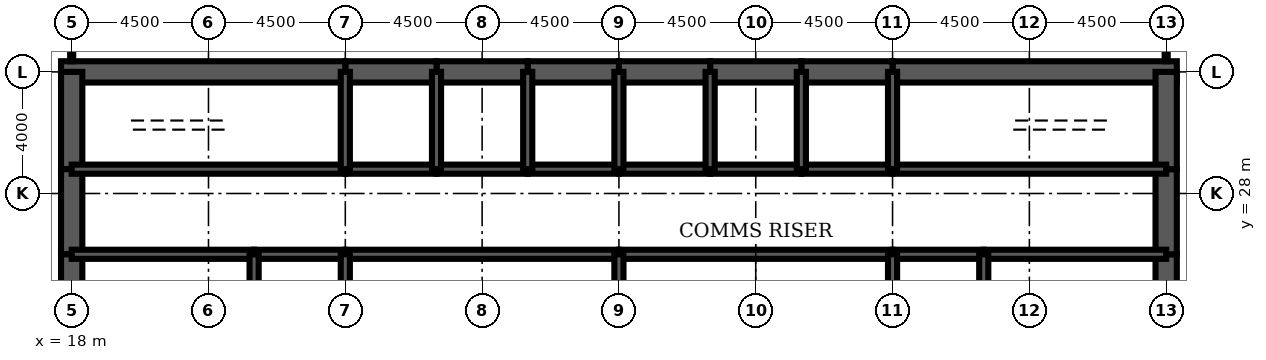
"""IFC4 building model, lengths in metres.
Left out: names, types, materials, properties, quantities, classifications, styles, units other than length and angle.
Written with IfcOpenShell. Run it as: python <this file> out.ifc"""

import sys

from ifc_helpers import new_model, si_unit, direction, frame, frame_2d, origin, place, context, subcontext, project, spatial, rectangle, extrude, element, fill, save


model = new_model("IFC4")
c1 = context("Model", 3, precision=1e-05, world=origin(), true_north=direction((0.0, 1.0)))
c2 = subcontext(c1, "Body", "Model", "MODEL_VIEW")
j1 = project(units=[si_unit("LENGTHUNIT", "METRE"), si_unit("PLANEANGLEUNIT", "RADIAN")], contexts=[c1])
p1 = place(None, origin())
s1 = spatial("IfcSite", under=j1, at=p1, CompositionType="ELEMENT")
p2 = place(p1, origin())
s2 = spatial("IfcBuilding", under=s1, at=p2, CompositionType="ELEMENT")
p3 = place(p2, frame((0.0, 0.0, 325.7)))
s3 = spatial("IfcBuildingStorey", under=s2, at=p3, CompositionType="ELEMENT", Elevation=325.7)
p4 = place(p3, frame((54.35, 32.0, 0.0), z_axis=(0.0, 0.0, 1.0), x_axis=(-1.0, 0.0, 0.0)))
e1 = element("IfcWall", 1, at=p4, inside=s3, PredefinedType="SHEAR", context=c2, shape_type="SweptSolid", body=[
    extrude(rectangle(XDim=9.35, YDim=0.7, at=frame_2d((4.675, 0.0))), origin(), (0.0, 0.0, 1.0), 4.2),
])
for number, where, z_axis, x_axis in (
    (2, (45.0, 32.0, 0.0), (0.0, 0.0, 1.0), (-1.0, 0.0, 0.0)),
    (3, (42.0, 32.0, 0.0), (0.0, 0.0, 1.0), (-1.0, 0.0, 0.0)),
    (4, (39.0, 32.0, 0.0), (0.0, 0.0, 1.0), (-1.0, 0.0, 0.0)),
    (5, (36.0, 32.0, 0.0), (0.0, 0.0, 1.0), (-1.0, 0.0, 0.0)),
    (6, (33.0, 32.0, 0.0), (0.0, 0.0, 1.0), (-1.0, 0.0, 0.0)),
    (7, (30.0, 32.0, 0.0), (0.0, 0.0, 1.0), (-1.0, 0.0, 0.0)),
):
    element("IfcWall", number, at=place(p3, frame(where, z_axis=z_axis, x_axis=x_axis)), inside=s3, PredefinedType="SHEAR", context=c2, shape_type="SweptSolid", body=[
        extrude(rectangle(XDim=3.0, YDim=0.7, at=frame_2d((1.5, 0.0))), origin(), (0.0, 0.0, 1.0), 4.2),
    ])
p5 = place(p3, frame((27.0, 32.0, 0.0), z_axis=(0.0, 0.0, 1.0), x_axis=(-1.0, 0.0, 0.0)))
e8 = element("IfcWall", 8, at=p5, inside=s3, PredefinedType="SHEAR", context=c2, shape_type="SweptSolid", body=[
    extrude(rectangle(XDim=9.35, YDim=0.7, at=frame_2d((4.675, 0.0))), origin(), (0.0, 0.0, 1.0), 4.2),
])
p6 = place(p3, frame((18.0, 32.0, 0.0), z_axis=(0.0, 0.0, 1.0), x_axis=(0.0, -1.0, 0.0)))
e9 = element("IfcWall", 9, at=p6, inside=s3, PredefinedType="SHEAR", context=c2, shape_type="SweptSolid", body=[
    extrude(rectangle(XDim=3.2, YDim=0.7, at=frame_2d((1.6, 0.0))), origin(), (0.0, 0.0, 1.0), 4.2),
])
p7 = place(p3, frame((18.0, 28.8, 0.0), z_axis=(0.0, 0.0, 1.0), x_axis=(0.0, -1.0, 0.0)))
e10 = element("IfcWall", 10, at=p7, inside=s3, PredefinedType="SHEAR", context=c2, shape_type="SweptSolid", body=[
    extrude(rectangle(XDim=2.8, YDim=0.7, at=frame_2d((1.4, 0.0))), origin(), (0.0, 0.0, 1.0), 4.2),
])
p8 = place(p7, frame((0.4, 0.0, 0.0)))
e11 = element("IfcOpeningElement", 11, at=p8, cuts=e10, PredefinedType="OPENING", context=c2, shape_type="SweptSolid", body=[
    extrude(rectangle(XDim=1.8, YDim=2.1, at=frame_2d((0.9, 1.05))), frame((0.0, 0.36, 0.0), z_axis=(0.0, -1.0, 0.0), x_axis=(1.0, 0.0, 0.0)), (0.0, 0.0, 1.0), 0.72),
])
for number, where, z_axis, x_axis in (
    (12, (18.0, 26.0, 0.0), (0.0, 0.0, 1.0), (0.0, -1.0, 0.0)),
    (13, (54.0, 22.0, 0.0), (0.0, 0.0, 1.0), (0.0, 1.0, 0.0)),
):
    element("IfcWall", number, at=place(p3, frame(where, z_axis=z_axis, x_axis=x_axis)), inside=s3, PredefinedType="SHEAR", context=c2, shape_type="SweptSolid", body=[
        extrude(rectangle(XDim=4.0, YDim=0.7, at=frame_2d((2.0, 0.0))), origin(), (0.0, 0.0, 1.0), 4.2),
    ])
p9 = place(p3, frame((54.0, 26.0, 0.0), z_axis=(0.0, 0.0, 1.0), x_axis=(0.0, 1.0, 0.0)))
e14 = element("IfcWall", 14, at=p9, inside=s3, PredefinedType="SHEAR", context=c2, shape_type="SweptSolid", body=[
    extrude(rectangle(XDim=2.8, YDim=0.7, at=frame_2d((1.4, 0.0))), origin(), (0.0, 0.0, 1.0), 4.2),
])
p10 = place(p9, frame((0.6, 0.0, 0.0)))
e15 = element("IfcOpeningElement", 15, at=p10, cuts=e14, PredefinedType="OPENING", context=c2, shape_type="SweptSolid", body=[
    extrude(rectangle(XDim=1.8, YDim=2.1, at=frame_2d((0.9, 1.05))), frame((0.0, 0.36, 0.0), z_axis=(0.0, -1.0, 0.0), x_axis=(1.0, 0.0, 0.0)), (0.0, 0.0, 1.0), 0.72),
])
p11 = place(p3, frame((54.0, 28.8, 0.0), z_axis=(0.0, 0.0, 1.0), x_axis=(0.0, 1.0, 0.0)))
e16 = element("IfcWall", 16, at=p11, inside=s3, PredefinedType="SHEAR", context=c2, shape_type="SweptSolid", body=[
    extrude(rectangle(XDim=3.2, YDim=0.7, at=frame_2d((1.6, 0.0))), origin(), (0.0, 0.0, 1.0), 4.2),
])
p12 = place(p3, frame((18.0, 28.8, 0.0), z_axis=(0.0, 0.0, 1.0), x_axis=(1.0, 0.0, 0.0)))
e17 = element("IfcWall", 17, at=p12, inside=s3, PredefinedType="SOLIDWALL", context=c2, shape_type="SweptSolid", body=[
    extrude(rectangle(XDim=9.0, YDim=0.3, at=frame_2d((4.5, 0.0))), origin(), (0.0, 0.0, 1.0), 4.2),
])
p13 = place(p12, frame((0.65, 0.0, 0.0)))
e18 = element("IfcOpeningElement", 18, at=p13, cuts=e17, PredefinedType="OPENING", context=c2, shape_type="SweptSolid", body=[
    extrude(rectangle(XDim=1.0, YDim=2.1, at=frame_2d((0.5, 1.05))), frame((0.0, 0.16, 0.0), z_axis=(0.0, -1.0, 0.0), x_axis=(1.0, 0.0, 0.0)), (0.0, 0.0, 1.0), 0.32),
])
p14 = place(p3, frame((27.0, 28.8, 0.0), z_axis=(0.0, 0.0, 1.0), x_axis=(1.0, 0.0, 0.0)))
e19 = element("IfcWall", 19, at=p14, inside=s3, PredefinedType="SOLIDWALL", context=c2, shape_type="SweptSolid", body=[
    extrude(rectangle(XDim=3.0, YDim=0.3, at=frame_2d((1.5, 0.0))), origin(), (0.0, 0.0, 1.0), 4.2),
])
p15 = place(p14, frame((0.95, 0.0, 0.0)))
e20 = element("IfcOpeningElement", 20, at=p15, cuts=e19, PredefinedType="OPENING", context=c2, shape_type="SweptSolid", body=[
    extrude(rectangle(XDim=1.1, YDim=2.2, at=frame_2d((0.55, 1.1))), frame((0.0, 0.16, 0.0), z_axis=(0.0, -1.0, 0.0), x_axis=(1.0, 0.0, 0.0)), (0.0, 0.0, 1.0), 0.32),
])
p16 = place(p3, frame((30.0, 28.8, 0.0), z_axis=(0.0, 0.0, 1.0), x_axis=(1.0, 0.0, 0.0)))
e21 = element("IfcWall", 21, at=p16, inside=s3, PredefinedType="SOLIDWALL", context=c2, shape_type="SweptSolid", body=[
    extrude(rectangle(XDim=3.0, YDim=0.3, at=frame_2d((1.5, 0.0))), origin(), (0.0, 0.0, 1.0), 4.2),
])
p17 = place(p16, frame((0.95, 0.0, 0.0)))
e22 = element("IfcOpeningElement", 22, at=p17, cuts=e21, PredefinedType="OPENING", context=c2, shape_type="SweptSolid", body=[
    extrude(rectangle(XDim=1.1, YDim=2.2, at=frame_2d((0.55, 1.1))), frame((0.0, 0.16, 0.0), z_axis=(0.0, -1.0, 0.0), x_axis=(1.0, 0.0, 0.0)), (0.0, 0.0, 1.0), 0.32),
])
p18 = place(p3, frame((33.0, 28.8, 0.0), z_axis=(0.0, 0.0, 1.0), x_axis=(1.0, 0.0, 0.0)))
e23 = element("IfcWall", 23, at=p18, inside=s3, PredefinedType="SOLIDWALL", context=c2, shape_type="SweptSolid", body=[
    extrude(rectangle(XDim=3.0, YDim=0.3, at=frame_2d((1.5, 0.0))), origin(), (0.0, 0.0, 1.0), 4.2),
])
p19 = place(p18, frame((0.95, 0.0, 0.0)))
e24 = element("IfcOpeningElement", 24, at=p19, cuts=e23, PredefinedType="OPENING", context=c2, shape_type="SweptSolid", body=[
    extrude(rectangle(XDim=1.1, YDim=2.2, at=frame_2d((0.55, 1.1))), frame((0.0, 0.16, 0.0), z_axis=(0.0, -1.0, 0.0), x_axis=(1.0, 0.0, 0.0)), (0.0, 0.0, 1.0), 0.32),
])
p20 = place(p3, frame((36.0, 28.8, 0.0), z_axis=(0.0, 0.0, 1.0), x_axis=(1.0, 0.0, 0.0)))
e25 = element("IfcWall", 25, at=p20, inside=s3, PredefinedType="SOLIDWALL", context=c2, shape_type="SweptSolid", body=[
    extrude(rectangle(XDim=3.0, YDim=0.3, at=frame_2d((1.5, 0.0))), origin(), (0.0, 0.0, 1.0), 4.2),
])
p21 = place(p20, frame((1.0, 0.0, 0.0)))
e26 = element("IfcOpeningElement", 26, at=p21, cuts=e25, PredefinedType="OPENING", context=c2, shape_type="SweptSolid", body=[
    extrude(rectangle(XDim=1.0, YDim=2.1, at=frame_2d((0.5, 1.05))), frame((0.0, 0.16, 0.0), z_axis=(0.0, -1.0, 0.0), x_axis=(1.0, 0.0, 0.0)), (0.0, 0.0, 1.0), 0.32),
])
p22 = place(p3, frame((39.0, 28.8, 0.0), z_axis=(0.0, 0.0, 1.0), x_axis=(1.0, 0.0, 0.0)))
e27 = element("IfcWall", 27, at=p22, inside=s3, PredefinedType="SOLIDWALL", context=c2, shape_type="SweptSolid", body=[
    extrude(rectangle(XDim=3.0, YDim=0.3, at=frame_2d((1.5, 0.0))), origin(), (0.0, 0.0, 1.0), 4.2),
])
p23 = place(p22, frame((1.0, 0.0, 0.0)))
e28 = element("IfcOpeningElement", 28, at=p23, cuts=e27, PredefinedType="OPENING", context=c2, shape_type="SweptSolid", body=[
    extrude(rectangle(XDim=1.0, YDim=2.1, at=frame_2d((0.5, 1.05))), frame((0.0, 0.16, 0.0), z_axis=(0.0, -1.0, 0.0), x_axis=(1.0, 0.0, 0.0)), (0.0, 0.0, 1.0), 0.32),
])
p24 = place(p3, frame((42.0, 28.8, 0.0), z_axis=(0.0, 0.0, 1.0), x_axis=(1.0, 0.0, 0.0)))
e29 = element("IfcWall", 29, at=p24, inside=s3, PredefinedType="SOLIDWALL", context=c2, shape_type="SweptSolid", body=[
    extrude(rectangle(XDim=3.0, YDim=0.3, at=frame_2d((1.5, 0.0))), origin(), (0.0, 0.0, 1.0), 4.2),
])
p25 = place(p24, frame((0.95, 0.0, 0.0)))
e30 = element("IfcOpeningElement", 30, at=p25, cuts=e29, PredefinedType="OPENING", context=c2, shape_type="SweptSolid", body=[
    extrude(rectangle(XDim=1.1, YDim=2.2, at=frame_2d((0.55, 1.1))), frame((0.0, 0.16, 0.0), z_axis=(0.0, -1.0, 0.0), x_axis=(1.0, 0.0, 0.0)), (0.0, 0.0, 1.0), 0.32),
])
p26 = place(p3, frame((45.0, 28.8, 0.0), z_axis=(0.0, 0.0, 1.0), x_axis=(1.0, 0.0, 0.0)))
e31 = element("IfcWall", 31, at=p26, inside=s3, PredefinedType="SOLIDWALL", context=c2, shape_type="SweptSolid", body=[
    extrude(rectangle(XDim=9.0, YDim=0.3, at=frame_2d((4.5, 0.0))), origin(), (0.0, 0.0, 1.0), 4.2),
])
p27 = place(p26, frame((7.35, 0.0, 0.0)))
e32 = element("IfcOpeningElement", 32, at=p27, cuts=e31, PredefinedType="OPENING", context=c2, shape_type="SweptSolid", body=[
    extrude(rectangle(XDim=1.0, YDim=2.1, at=frame_2d((0.5, 1.05))), frame((0.0, 0.16, 0.0), z_axis=(0.0, -1.0, 0.0), x_axis=(1.0, 0.0, 0.0)), (0.0, 0.0, 1.0), 0.32),
])
p28 = place(p3, frame((18.0, 26.0, 0.0), z_axis=(0.0, 0.0, 1.0), x_axis=(1.0, 0.0, 0.0)))
e33 = element("IfcWall", 33, at=p28, inside=s3, PredefinedType="SOLIDWALL", context=c2, shape_type="SweptSolid", body=[
    extrude(rectangle(XDim=6.0, YDim=0.3, at=frame_2d((3.0, 0.0))), origin(), (0.0, 0.0, 1.0), 4.2),
])
p29 = place(p3, frame((24.0, 26.0, 0.0), z_axis=(0.0, 0.0, 1.0), x_axis=(1.0, 0.0, 0.0)))
e34 = element("IfcWall", 34, at=p29, inside=s3, PredefinedType="SOLIDWALL", context=c2, shape_type="SweptSolid", body=[
    extrude(rectangle(XDim=3.0, YDim=0.3, at=frame_2d((1.5, 0.0))), origin(), (0.0, 0.0, 1.0), 4.2),
])
for number, where, z_axis, x_axis in (
    (35, (27.0, 26.0, 0.0), (0.0, 0.0, 1.0), (1.0, 0.0, 0.0)),
    (36, (36.0, 26.0, 0.0), (0.0, 0.0, 1.0), (1.0, 0.0, 0.0)),
):
    element("IfcWall", number, at=place(p3, frame(where, z_axis=z_axis, x_axis=x_axis)), inside=s3, PredefinedType="SOLIDWALL", context=c2, shape_type="SweptSolid", body=[
        extrude(rectangle(XDim=9.0, YDim=0.3, at=frame_2d((4.5, 0.0))), origin(), (0.0, 0.0, 1.0), 4.2),
    ])
p30 = place(p3, frame((45.0, 26.0, 0.0), z_axis=(0.0, 0.0, 1.0), x_axis=(1.0, 0.0, 0.0)))
e37 = element("IfcWall", 37, at=p30, inside=s3, PredefinedType="SOLIDWALL", context=c2, shape_type="SweptSolid", body=[
    extrude(rectangle(XDim=3.0, YDim=0.3, at=frame_2d((1.5, 0.0))), origin(), (0.0, 0.0, 1.0), 4.2),
])
p31 = place(p3, frame((48.0, 26.0, 0.0), z_axis=(0.0, 0.0, 1.0), x_axis=(1.0, 0.0, 0.0)))
e38 = element("IfcWall", 38, at=p31, inside=s3, PredefinedType="SOLIDWALL", context=c2, shape_type="SweptSolid", body=[
    extrude(rectangle(XDim=6.0, YDim=0.3, at=frame_2d((3.0, 0.0))), origin(), (0.0, 0.0, 1.0), 4.2),
])
for number, where, z_axis, x_axis in (
    (39, (27.0, 28.8, 0.0), (0.0, 0.0, 1.0), (0.0, 1.0, 0.0)),
    (40, (30.0, 28.8, 0.0), (0.0, 0.0, 1.0), (0.0, 1.0, 0.0)),
    (41, (33.0, 28.8, 0.0), (0.0, 0.0, 1.0), (0.0, 1.0, 0.0)),
    (42, (36.0, 28.8, 0.0), (0.0, 0.0, 1.0), (0.0, 1.0, 0.0)),
    (43, (39.0, 28.8, 0.0), (0.0, 0.0, 1.0), (0.0, 1.0, 0.0)),
    (44, (42.0, 28.8, 0.0), (0.0, 0.0, 1.0), (0.0, 1.0, 0.0)),
    (45, (45.0, 28.8, 0.0), (0.0, 0.0, 1.0), (0.0, 1.0, 0.0)),
):
    element("IfcWall", number, at=place(p3, frame(where, z_axis=z_axis, x_axis=x_axis)), inside=s3, PredefinedType="SOLIDWALL", context=c2, shape_type="SweptSolid", body=[
        extrude(rectangle(XDim=3.2, YDim=0.3, at=frame_2d((1.6, 0.0))), origin(), (0.0, 0.0, 1.0), 4.2),
    ])
for number, where, z_axis, x_axis in (
    (46, (24.0, 22.0, 0.0), (0.0, 0.0, 1.0), (0.0, 1.0, 0.0)),
    (47, (27.0, 22.0, 0.0), (0.0, 0.0, 1.0), (0.0, 1.0, 0.0)),
    (48, (36.0, 22.0, 0.0), (0.0, 0.0, 1.0), (0.0, 1.0, 0.0)),
    (49, (45.0, 22.0, 0.0), (0.0, 0.0, 1.0), (0.0, 1.0, 0.0)),
    (50, (48.0, 22.0, 0.0), (0.0, 0.0, 1.0), (0.0, 1.0, 0.0)),
):
    element("IfcWall", number, at=place(p3, frame(where, z_axis=z_axis, x_axis=x_axis)), inside=s3, PredefinedType="SOLIDWALL", context=c2, shape_type="SweptSolid", body=[
        extrude(rectangle(XDim=4.0, YDim=0.3, at=frame_2d((2.0, 0.0))), origin(), (0.0, 0.0, 1.0), 4.2),
    ])
p32 = place(p3, frame((42.0, 22.15, 0.0), z_axis=(0.0, 0.0, 1.0), x_axis=(0.0, 1.0, 0.0)))
e51 = element("IfcWall", 51, at=p32, inside=s3, PredefinedType="PARTITIONING", context=c2, shape_type="SweptSolid", body=[
    extrude(rectangle(XDim=3.7, YDim=0.15, at=frame_2d((1.85, 0.0))), origin(), (0.0, 0.0, 1.0), 3.0),
])
p33 = place(p32, frame((2.2, 0.0, 0.0)))
e52 = element("IfcOpeningElement", 52, at=p33, cuts=e51, PredefinedType="OPENING", context=c2, shape_type="SweptSolid", body=[
    extrude(rectangle(XDim=1.0, YDim=2.1, at=frame_2d((0.5, 1.05))), frame((0.0, 0.085, 0.0), z_axis=(0.0, -1.0, 0.0), x_axis=(1.0, 0.0, 0.0)), (0.0, 0.0, 1.0), 0.17),
])
for number, where, z_axis, x_axis in (
    (53, (20.225, 22.15, 0.0), (0.0, 0.0, 1.0), (0.0, 1.0, 0.0)),
    (54, (52.075, 22.15, 0.0), (0.0, 0.0, 1.0), (0.0, 1.0, 0.0)),
):
    element("IfcWall", number, at=place(p3, frame(where, z_axis=z_axis, x_axis=x_axis)), inside=s3, PredefinedType="PARTITIONING", context=c2, shape_type="SweptSolid", body=[
        extrude(rectangle(XDim=3.7, YDim=0.15, at=frame_2d((1.85, 0.0))), origin(), (0.0, 0.0, 1.0), 3.0),
    ])
p34 = place(p3, frame((18.0, 32.35, 0.0), z_axis=(0.0, 0.0, 1.0), x_axis=(0.0, 1.0, 0.0)))
e55 = element("IfcWall", 55, at=p34, inside=s3, PredefinedType="PARTITIONING", context=c2, shape_type="SweptSolid", body=[
    extrude(rectangle(XDim=11.2, YDim=0.1, at=frame_2d((5.6, 0.0))), origin(), (0.0, 0.0, 1.0), 3.0),
])
p35 = place(p34, frame((4.8, 0.0, 0.0)))
e56 = element("IfcOpeningElement", 56, at=p35, cuts=e55, PredefinedType="OPENING", context=c2, shape_type="SweptSolid", body=[
    extrude(rectangle(XDim=1.6, YDim=2.1, at=frame_2d((0.8, 1.05))), frame((0.0, 0.06, 0.0), z_axis=(0.0, -1.0, 0.0), x_axis=(1.0, 0.0, 0.0)), (0.0, 0.0, 1.0), 0.12),
])
p36 = place(p3, frame((54.0, 32.35, 0.0), z_axis=(0.0, 0.0, 1.0), x_axis=(0.0, 1.0, 0.0)))
e57 = element("IfcWall", 57, at=p36, inside=s3, PredefinedType="PARTITIONING", context=c2, shape_type="SweptSolid", body=[
    extrude(rectangle(XDim=11.2, YDim=0.1, at=frame_2d((5.6, 0.0))), origin(), (0.0, 0.0, 1.0), 3.0),
])
p37 = place(p36, frame((4.8, 0.0, 0.0)))
e58 = element("IfcOpeningElement", 58, at=p37, cuts=e57, PredefinedType="OPENING", context=c2, shape_type="SweptSolid", body=[
    extrude(rectangle(XDim=1.6, YDim=2.1, at=frame_2d((0.8, 1.05))), frame((0.0, 0.06, 0.0), z_axis=(0.0, -1.0, 0.0), x_axis=(1.0, 0.0, 0.0)), (0.0, 0.0, 1.0), 0.12),
])
p38 = place(p33, origin())
e59 = element("IfcDoor", 59, at=p38, inside=s3, OperationType="SINGLE_SWING_RIGHT", PredefinedType="DOOR", context=c2, shape_type="SweptSolid", body=[
    extrude(rectangle(XDim=1.0, YDim=2.1, at=frame_2d((0.5, 1.05))), frame((0.0, 0.025, 0.0), z_axis=(0.0, -1.0, 0.0), x_axis=(1.0, 0.0, 0.0)), (0.0, 0.0, 1.0), 0.05),
])
fill(e52, e59)
p39 = place(p25, origin())
e60 = element("IfcDoor", 60, at=p39, inside=s3, OperationType="DOUBLE_DOOR_SLIDING", PredefinedType="USERDEFINED", context=c2, shape_type="SweptSolid", body=[
    extrude(rectangle(XDim=1.1, YDim=2.2, at=frame_2d((0.55, 1.1))), frame((0.0, 0.025, 0.0), z_axis=(0.0, -1.0, 0.0), x_axis=(1.0, 0.0, 0.0)), (0.0, 0.0, 1.0), 0.05),
])
fill(e30, e60)
p40 = place(p15, origin())
e61 = element("IfcDoor", 61, at=p40, inside=s3, OperationType="DOUBLE_DOOR_SLIDING", PredefinedType="USERDEFINED", context=c2, shape_type="SweptSolid", body=[
    extrude(rectangle(XDim=1.1, YDim=2.2, at=frame_2d((0.55, 1.1))), frame((0.0, 0.025, 0.0), z_axis=(0.0, -1.0, 0.0), x_axis=(1.0, 0.0, 0.0)), (0.0, 0.0, 1.0), 0.05),
])
fill(e20, e61)
p41 = place(p17, origin())
e62 = element("IfcDoor", 62, at=p41, inside=s3, OperationType="DOUBLE_DOOR_SLIDING", PredefinedType="USERDEFINED", context=c2, shape_type="SweptSolid", body=[
    extrude(rectangle(XDim=1.1, YDim=2.2, at=frame_2d((0.55, 1.1))), frame((0.0, 0.025, 0.0), z_axis=(0.0, -1.0, 0.0), x_axis=(1.0, 0.0, 0.0)), (0.0, 0.0, 1.0), 0.05),
])
fill(e22, e62)
p42 = place(p19, origin())
e63 = element("IfcDoor", 63, at=p42, inside=s3, OperationType="DOUBLE_DOOR_SLIDING", PredefinedType="USERDEFINED", context=c2, shape_type="SweptSolid", body=[
    extrude(rectangle(XDim=1.1, YDim=2.2, at=frame_2d((0.55, 1.1))), frame((0.0, 0.025, 0.0), z_axis=(0.0, -1.0, 0.0), x_axis=(1.0, 0.0, 0.0)), (0.0, 0.0, 1.0), 0.05),
])
fill(e24, e63)
p43 = place(p13, origin())
e64 = element("IfcDoor", 64, at=p43, inside=s3, OperationType="SINGLE_SWING_LEFT", PredefinedType="DOOR", context=c2, shape_type="SweptSolid", body=[
    extrude(rectangle(XDim=1.0, YDim=2.1, at=frame_2d((0.5, 1.05))), frame((0.0, 0.025, 0.0), z_axis=(0.0, -1.0, 0.0), x_axis=(1.0, 0.0, 0.0)), (0.0, 0.0, 1.0), 0.05),
])
fill(e18, e64)
p44 = place(p27, origin())
e65 = element("IfcDoor", 65, at=p44, inside=s3, OperationType="SINGLE_SWING_RIGHT", PredefinedType="DOOR", context=c2, shape_type="SweptSolid", body=[
    extrude(rectangle(XDim=1.0, YDim=2.1, at=frame_2d((0.5, 1.05))), frame((0.0, 0.025, 0.0), z_axis=(0.0, -1.0, 0.0), x_axis=(1.0, 0.0, 0.0)), (0.0, 0.0, 1.0), 0.05),
])
fill(e32, e65)
p45 = place(p8, origin())
e66 = element("IfcDoor", 66, at=p45, inside=s3, OperationType="SINGLE_SWING_LEFT", PredefinedType="DOOR", context=c2, shape_type="SweptSolid", body=[
    extrude(rectangle(XDim=1.8, YDim=2.1, at=frame_2d((0.9, 1.05))), frame((0.0, 0.35, 0.0), z_axis=(0.0, -1.0, 0.0), x_axis=(1.0, 0.0, 0.0)), (0.0, 0.0, 1.0), 0.699),
])
fill(e11, e66)
p46 = place(p10, origin())
e67 = element("IfcDoor", 67, at=p46, inside=s3, OperationType="SINGLE_SWING_LEFT", PredefinedType="DOOR", context=c2, shape_type="SweptSolid", body=[
    extrude(rectangle(XDim=1.8, YDim=2.1, at=frame_2d((0.9, 1.05))), frame((0.0, 0.35, 0.0), z_axis=(0.0, -1.0, 0.0), x_axis=(1.0, 0.0, 0.0)), (0.0, 0.0, 1.0), 0.699),
])
fill(e15, e67)
p47 = place(p21, origin())
e68 = element("IfcDoor", 68, at=p47, inside=s3, OperationType="SINGLE_SWING_LEFT", PredefinedType="DOOR", context=c2, shape_type="SweptSolid", body=[
    extrude(rectangle(XDim=1.0, YDim=2.1, at=frame_2d((0.5, 1.05))), frame((0.0, 0.025, 0.0), z_axis=(0.0, -1.0, 0.0), x_axis=(1.0, 0.0, 0.0)), (0.0, 0.0, 1.0), 0.05),
])
fill(e26, e68)
p48 = place(p23, origin())
e69 = element("IfcDoor", 69, at=p48, inside=s3, OperationType="SINGLE_SWING_LEFT", PredefinedType="DOOR", context=c2, shape_type="SweptSolid", body=[
    extrude(rectangle(XDim=1.0, YDim=2.1, at=frame_2d((0.5, 1.05))), frame((0.0, 0.025, 0.0), z_axis=(0.0, -1.0, 0.0), x_axis=(1.0, 0.0, 0.0)), (0.0, 0.0, 1.0), 0.05),
])
fill(e28, e69)
save(model, sys.argv[1])
